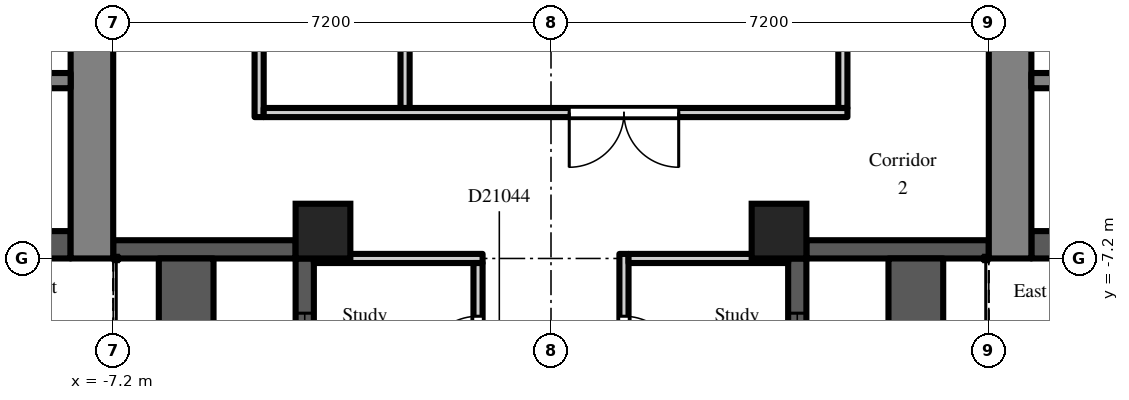
"""IFC4 building model, lengths in metres.
Left out: names, types, materials, properties, quantities, classifications, styles, units other than length and angle.
Written with IfcOpenShell. Run it as: python <this file> out.ifc"""

import sys

from ifc_helpers import new_model, si_unit, direction, frame, frame_2d, origin, origin_2d, place, context, subcontext, project, spatial, rectangle, extrude, element, fill, save


model = new_model("IFC4")
c1 = context("Model", 3, precision=1e-05, world=origin(), true_north=direction((0.0, 1.0)))
c2 = subcontext(c1, "Body", "Model", "MODEL_VIEW")
j1 = project(units=[si_unit("LENGTHUNIT", "METRE"), si_unit("PLANEANGLEUNIT", "RADIAN")], contexts=[c1])
p1 = place(None, origin())
s1 = spatial("IfcSite", under=j1, at=p1, CompositionType="ELEMENT")
p2 = place(p1, origin())
s2 = spatial("IfcBuilding", under=s1, at=p2, CompositionType="ELEMENT")
p3 = place(p2, frame((0.0, 0.0, 147.3)))
s3 = spatial("IfcBuildingStorey", under=s2, at=p3, CompositionType="ELEMENT", Elevation=147.3)
for number, where, z_axis, x_axis in (
    (1, (-3.75, -6.75, 0.0), (0.0, 0.0, 1.0), (1.0, 0.0, 0.0)),
    (2, (3.75, -6.75, 0.0), (0.0, 0.0, 1.0), (1.0, 0.0, 0.0)),
):
    element("IfcColumn", number, at=place(p3, frame(where, z_axis=z_axis, x_axis=x_axis)), inside=s3, PredefinedType="COLUMN", context=c2, shape_type="SweptSolid", body=[
        extrude(rectangle(XDim=0.9, YDim=0.9, at=origin_2d()), origin(), (0.0, 0.0, 1.0), 3.0),
    ])
p4 = place(p3, frame((-7.2, -7.05, 0.0), z_axis=(0.0, 0.0, 1.0), x_axis=(1.0, 0.0, 0.0)))
e3 = element("IfcWall", 3, at=p4, inside=s3, PredefinedType="SOLIDWALL", context=c2, shape_type="SweptSolid", body=[
    extrude(rectangle(XDim=3.0, YDim=0.3, at=frame_2d((1.5, 0.0))), origin(), (0.0, 0.0, 1.0), 2.2),
])
p5 = place(p3, frame((-4.05, -7.2, 0.0), z_axis=(0.0, 0.0, 1.0), x_axis=(0.0, -1.0, 0.0)))
e4 = element("IfcWall", 4, at=p5, inside=s3, PredefinedType="SOLIDWALL", context=c2, shape_type="SweptSolid", body=[
    extrude(rectangle(XDim=7.2, YDim=0.3, at=frame_2d((3.6, 0.0))), origin(), (0.0, 0.0, 1.0), 2.2),
])
p6 = place(p5, frame((3.0, 0.0, 0.0)))
e5 = element("IfcOpeningElement", 5, at=p6, cuts=e4, PredefinedType="OPENING", context=c2, shape_type="SweptSolid", body=[
    extrude(rectangle(XDim=1.2, YDim=2.05, at=frame_2d((0.6, 1.025))), frame((0.0, 0.16, 0.0), z_axis=(0.0, -1.0, 0.0), x_axis=(1.0, 0.0, 0.0)), (0.0, 0.0, 1.0), 0.32),
])
p7 = place(p5, frame((0.9, 0.0, 0.2)))
e6 = element("IfcOpeningElement", 6, at=p7, cuts=e4, PredefinedType="OPENING", context=c2, shape_type="SweptSolid", body=[
    extrude(rectangle(XDim=1.8, YDim=1.85, at=frame_2d((0.9, 0.925))), frame((0.0, 0.16, 0.0), z_axis=(0.0, -1.0, 0.0), x_axis=(1.0, 0.0, 0.0)), (0.0, 0.0, 1.0), 0.32),
])
p8 = place(p5, frame((4.5, 0.0, 0.2)))
e7 = element("IfcOpeningElement", 7, at=p8, cuts=e4, PredefinedType="OPENING", context=c2, shape_type="SweptSolid", body=[
    extrude(rectangle(XDim=1.8, YDim=1.85, at=frame_2d((0.9, 0.925))), frame((0.0, 0.16, 0.0), z_axis=(0.0, -1.0, 0.0), x_axis=(1.0, 0.0, 0.0)), (0.0, 0.0, 1.0), 0.32),
])
p9 = place(p3, frame((4.05, -14.4, 0.0), z_axis=(0.0, 0.0, 1.0), x_axis=(0.0, 1.0, 0.0)))
e8 = element("IfcWall", 8, at=p9, inside=s3, PredefinedType="SOLIDWALL", context=c2, shape_type="SweptSolid", body=[
    extrude(rectangle(XDim=7.2, YDim=0.3, at=frame_2d((3.6, 0.0))), origin(), (0.0, 0.0, 1.0), 2.2),
])
p10 = place(p9, frame((3.0, 0.0, 0.0)))
e9 = element("IfcOpeningElement", 9, at=p10, cuts=e8, PredefinedType="OPENING", context=c2, shape_type="SweptSolid", body=[
    extrude(rectangle(XDim=1.2, YDim=2.05, at=frame_2d((0.6, 1.025))), frame((0.0, 0.16, 0.0), z_axis=(0.0, -1.0, 0.0), x_axis=(1.0, 0.0, 0.0)), (0.0, 0.0, 1.0), 0.32),
])
p11 = place(p9, frame((0.9, 0.0, 0.2)))
e10 = element("IfcOpeningElement", 10, at=p11, cuts=e8, PredefinedType="OPENING", context=c2, shape_type="SweptSolid", body=[
    extrude(rectangle(XDim=1.8, YDim=1.85, at=frame_2d((0.9, 0.925))), frame((0.0, 0.16, 0.0), z_axis=(0.0, -1.0, 0.0), x_axis=(1.0, 0.0, 0.0)), (0.0, 0.0, 1.0), 0.32),
])
p12 = place(p9, frame((4.5, 0.0, 0.2)))
e11 = element("IfcOpeningElement", 11, at=p12, cuts=e8, PredefinedType="OPENING", context=c2, shape_type="SweptSolid", body=[
    extrude(rectangle(XDim=1.8, YDim=1.85, at=frame_2d((0.9, 0.925))), frame((0.0, 0.16, 0.0), z_axis=(0.0, -1.0, 0.0), x_axis=(1.0, 0.0, 0.0)), (0.0, 0.0, 1.0), 0.32),
])
p13 = place(p3, frame((4.2, -7.05, 0.0), z_axis=(0.0, 0.0, 1.0), x_axis=(1.0, 0.0, 0.0)))
e12 = element("IfcWall", 12, at=p13, inside=s3, PredefinedType="SOLIDWALL", context=c2, shape_type="SweptSolid", body=[
    extrude(rectangle(XDim=3.0, YDim=0.3, at=frame_2d((1.5, 0.0))), origin(), (0.0, 0.0, 1.0), 2.2),
])
for number, where, z_axis, x_axis in (
    (13, (6.0, -14.4, 0.0), (0.0, 0.0, 1.0), (0.0, 1.0, 0.0)),
    (14, (-6.0, -14.4, 0.0), (0.0, 0.0, 1.0), (0.0, 1.0, 0.0)),
):
    element("IfcWall", number, at=place(p3, frame(where, z_axis=z_axis, x_axis=x_axis)), inside=s3, PredefinedType="PARAPET", context=c2, shape_type="SweptSolid", body=[
        extrude(rectangle(XDim=7.2, YDim=0.9, at=frame_2d((3.6, 0.0))), origin(), (0.0, 0.0, 1.0), 0.8),
    ])
p14 = place(p3, frame((7.55, -7.2, 0.0), z_axis=(0.0, 0.0, 1.0), x_axis=(0.0, 1.0, 0.0)))
e15 = element("IfcWall", 15, at=p14, inside=s3, PredefinedType="SHEAR", context=c2, shape_type="SweptSolid", body=[
    extrude(rectangle(XDim=14.4, YDim=0.7, at=frame_2d((7.2, 0.0))), origin(), (0.0, 0.0, 1.0), 2.6),
])
p15 = place(p14, frame((6.0, 0.0, 0.0)))
e16 = element("IfcOpeningElement", 16, at=p15, cuts=e15, PredefinedType="OPENING", context=c2, shape_type="SweptSolid", body=[
    extrude(rectangle(XDim=2.4, YDim=2.2, at=frame_2d((1.2, 1.1))), frame((0.0, 0.36, 0.0), z_axis=(0.0, -1.0, 0.0), x_axis=(1.0, 0.0, 0.0)), (0.0, 0.0, 1.0), 0.72),
])
p16 = place(p3, frame((7.9, -6.975, 0.0), z_axis=(0.0, 0.0, 1.0), x_axis=(1.0, 0.0, 0.0)))
e17 = element("IfcWall", 17, at=p16, inside=s3, PredefinedType="SHEAR", context=c2, shape_type="SweptSolid", body=[
    extrude(rectangle(XDim=12.95, YDim=0.45, at=frame_2d((6.475, 0.0))), origin(), (0.0, 0.0, 1.0), 2.6),
])
p17 = place(p3, frame((7.9, -4.275, 0.0), z_axis=(0.0, 0.0, 1.0), x_axis=(1.0, 0.0, 0.0)))
e18 = element("IfcWall", 18, at=p17, inside=s3, PredefinedType="SHEAR", context=c2, shape_type="SweptSolid", body=[
    extrude(rectangle(XDim=1.95, YDim=0.25, at=frame_2d((0.975, 0.0))), origin(), (0.0, 0.0, 1.0), 2.6),
])
p18 = place(p3, frame((-7.55, -7.2, 0.0), z_axis=(0.0, 0.0, 1.0), x_axis=(0.0, 1.0, 0.0)))
e19 = element("IfcWall", 19, at=p18, inside=s3, PredefinedType="SHEAR", context=c2, shape_type="SweptSolid", body=[
    extrude(rectangle(XDim=14.4, YDim=0.7, at=frame_2d((7.2, 0.0))), origin(), (0.0, 0.0, 1.0), 2.6),
])
p19 = place(p18, frame((6.0, 0.0, 0.0)))
e20 = element("IfcOpeningElement", 20, at=p19, cuts=e19, PredefinedType="OPENING", context=c2, shape_type="SweptSolid", body=[
    extrude(rectangle(XDim=2.4, YDim=2.2, at=frame_2d((1.2, 1.1))), frame((0.0, 0.36, 0.0), z_axis=(0.0, -1.0, 0.0), x_axis=(1.0, 0.0, 0.0)), (0.0, 0.0, 1.0), 0.72),
])
p20 = place(p3, frame((-7.9, -6.975, 0.0), z_axis=(0.0, 0.0, 1.0), x_axis=(-1.0, 0.0, 0.0)))
e21 = element("IfcWall", 21, at=p20, inside=s3, PredefinedType="SHEAR", context=c2, shape_type="SweptSolid", body=[
    extrude(rectangle(XDim=12.95, YDim=0.45, at=frame_2d((6.475, 0.0))), origin(), (0.0, 0.0, 1.0), 2.6),
])
p21 = place(p3, frame((-7.9, -4.275, 0.0), z_axis=(0.0, 0.0, 1.0), x_axis=(-1.0, 0.0, 0.0)))
e22 = element("IfcWall", 22, at=p21, inside=s3, PredefinedType="SHEAR", context=c2, shape_type="SweptSolid", body=[
    extrude(rectangle(XDim=1.95, YDim=0.25, at=frame_2d((0.975, 0.0))), origin(), (0.0, 0.0, 1.0), 2.6),
])
p22 = place(p3, frame((-4.8, -4.875, 0.0), z_axis=(0.0, 0.0, 1.0), x_axis=(0.0, 1.0, 0.0)))
e23 = element("IfcWall", 23, at=p22, inside=s3, PredefinedType="PARTITIONING", context=c2, shape_type="SweptSolid", body=[
    extrude(rectangle(XDim=9.75, YDim=0.15, at=frame_2d((4.875, 0.0))), origin(), (0.0, 0.0, 1.0), 2.6),
])
p23 = place(p22, frame((5.625, 0.0, 0.0)))
e24 = element("IfcOpeningElement", 24, at=p23, cuts=e23, PredefinedType="OPENING", context=c2, shape_type="SweptSolid", body=[
    extrude(rectangle(XDim=0.9, YDim=2.1, at=frame_2d((0.45, 1.05))), frame((0.0, 0.085, 0.0), z_axis=(0.0, -1.0, 0.0), x_axis=(1.0, 0.0, 0.0)), (0.0, 0.0, 1.0), 0.17),
])
p24 = place(p22, frame((2.025, 0.0, 0.0)))
e25 = element("IfcOpeningElement", 25, at=p24, cuts=e23, PredefinedType="OPENING", context=c2, shape_type="SweptSolid", body=[
    extrude(rectangle(XDim=0.9, YDim=2.1, at=frame_2d((0.45, 1.05))), frame((0.0, 0.085, 0.0), z_axis=(0.0, -1.0, 0.0), x_axis=(1.0, 0.0, 0.0)), (0.0, 0.0, 1.0), 0.17),
])
p25 = place(p3, frame((-4.725, -4.8, 0.0), z_axis=(0.0, 0.0, 1.0), x_axis=(1.0, 0.0, 0.0)))
e26 = element("IfcWall", 26, at=p25, inside=s3, PredefinedType="PARTITIONING", context=c2, shape_type="SweptSolid", body=[
    extrude(rectangle(XDim=9.6, YDim=0.15, at=frame_2d((4.8, 0.0))), origin(), (0.0, 0.0, 1.0), 2.6),
])
p26 = place(p25, frame((5.025, 0.0, 0.0)))
e27 = element("IfcOpeningElement", 27, at=p26, cuts=e26, PredefinedType="OPENING", context=c2, shape_type="SweptSolid", body=[
    extrude(rectangle(XDim=1.8, YDim=2.1, at=frame_2d((0.9, 1.05))), frame((0.0, 0.085, 0.0), z_axis=(0.0, -1.0, 0.0), x_axis=(1.0, 0.0, 0.0)), (0.0, 0.0, 1.0), 0.17),
])
p27 = place(p3, frame((-3.9, -7.2, 0.0), z_axis=(0.0, 0.0, 1.0), x_axis=(1.0, 0.0, 0.0)))
e28 = element("IfcWall", 28, at=p27, inside=s3, PredefinedType="PARTITIONING", context=c2, shape_type="SweptSolid", body=[
    extrude(rectangle(XDim=2.775, YDim=0.15, at=frame_2d((1.387, 0.0))), origin(), (0.0, 0.0, 1.0), 2.6),
])
p28 = place(p3, frame((-2.4, -4.725, 0.0), z_axis=(0.0, 0.0, 1.0), x_axis=(0.0, 1.0, 0.0)))
e29 = element("IfcWall", 29, at=p28, inside=s3, PredefinedType="PARTITIONING", context=c2, shape_type="SweptSolid", body=[
    extrude(rectangle(XDim=4.65, YDim=0.15, at=frame_2d((2.325, 0.0))), origin(), (0.0, 0.0, 1.0), 2.6),
])
p29 = place(p3, frame((-1.2, -17.925, 0.0), z_axis=(0.0, 0.0, 1.0), x_axis=(0.0, 1.0, 0.0)))
e30 = element("IfcWall", 30, at=p29, inside=s3, PredefinedType="PARTITIONING", context=c2, shape_type="SweptSolid", body=[
    extrude(rectangle(XDim=10.65, YDim=0.15, at=frame_2d((5.325, 0.0))), origin(), (0.0, 0.0, 1.0), 2.6),
])
p30 = place(p29, frame((8.875, 0.0, 0.0)))
e31 = element("IfcOpeningElement", 31, at=p30, cuts=e30, PredefinedType="OPENING", context=c2, shape_type="SweptSolid", body=[
    extrude(rectangle(XDim=0.9, YDim=2.1, at=frame_2d((0.45, 1.05))), frame((0.0, 0.085, 0.0), z_axis=(0.0, -1.0, 0.0), x_axis=(1.0, 0.0, 0.0)), (0.0, 0.0, 1.0), 0.17),
])
p31 = place(p29, frame((5.275, 0.0, 0.0)))
e32 = element("IfcOpeningElement", 32, at=p31, cuts=e30, PredefinedType="OPENING", context=c2, shape_type="SweptSolid", body=[
    extrude(rectangle(XDim=0.9, YDim=2.1, at=frame_2d((0.45, 1.05))), frame((0.0, 0.085, 0.0), z_axis=(0.0, -1.0, 0.0), x_axis=(1.0, 0.0, 0.0)), (0.0, 0.0, 1.0), 0.17),
])
p32 = place(p29, frame((2.325, 0.0, 0.0)))
e33 = element("IfcOpeningElement", 33, at=p32, cuts=e30, PredefinedType="OPENING", context=c2, shape_type="SweptSolid", body=[
    extrude(rectangle(XDim=1.0, YDim=2.1, at=frame_2d((0.5, 1.05))), frame((0.0, 0.085, 0.0), z_axis=(0.0, -1.0, 0.0), x_axis=(1.0, 0.0, 0.0)), (0.0, 0.0, 1.0), 0.17),
])
p33 = place(p3, frame((1.2, -17.925, 0.0), z_axis=(0.0, 0.0, 1.0), x_axis=(0.0, 1.0, 0.0)))
e34 = element("IfcWall", 34, at=p33, inside=s3, PredefinedType="PARTITIONING", context=c2, shape_type="SweptSolid", body=[
    extrude(rectangle(XDim=10.8, YDim=0.15, at=frame_2d((5.4, 0.0))), origin(), (0.0, 0.0, 1.0), 2.6),
])
p34 = place(p33, frame((8.875, 0.0, 0.0)))
e35 = element("IfcOpeningElement", 35, at=p34, cuts=e34, PredefinedType="OPENING", context=c2, shape_type="SweptSolid", body=[
    extrude(rectangle(XDim=0.9, YDim=2.1, at=frame_2d((0.45, 1.05))), frame((0.0, 0.085, 0.0), z_axis=(0.0, -1.0, 0.0), x_axis=(1.0, 0.0, 0.0)), (0.0, 0.0, 1.0), 0.17),
])
p35 = place(p33, frame((5.275, 0.0, 0.0)))
e36 = element("IfcOpeningElement", 36, at=p35, cuts=e34, PredefinedType="OPENING", context=c2, shape_type="SweptSolid", body=[
    extrude(rectangle(XDim=0.9, YDim=2.1, at=frame_2d((0.45, 1.05))), frame((0.0, 0.085, 0.0), z_axis=(0.0, -1.0, 0.0), x_axis=(1.0, 0.0, 0.0)), (0.0, 0.0, 1.0), 0.17),
])
p36 = place(p33, frame((1.925, 0.0, 0.0)))
e37 = element("IfcOpeningElement", 37, at=p36, cuts=e34, PredefinedType="OPENING", context=c2, shape_type="SweptSolid", body=[
    extrude(rectangle(XDim=1.0, YDim=2.1, at=frame_2d((0.5, 1.05))), frame((0.0, 0.085, 0.0), z_axis=(0.0, -1.0, 0.0), x_axis=(1.0, 0.0, 0.0)), (0.0, 0.0, 1.0), 0.17),
])
p37 = place(p3, frame((1.275, -7.2, 0.0), z_axis=(0.0, 0.0, 1.0), x_axis=(1.0, 0.0, 0.0)))
e38 = element("IfcWall", 38, at=p37, inside=s3, PredefinedType="PARTITIONING", context=c2, shape_type="SweptSolid", body=[
    extrude(rectangle(XDim=2.625, YDim=0.15, at=frame_2d((1.312, 0.0))), origin(), (0.0, 0.0, 1.0), 2.6),
])
p38 = place(p3, frame((4.8, -4.725, 0.0), z_axis=(0.0, 0.0, 1.0), x_axis=(0.0, 1.0, 0.0)))
e39 = element("IfcWall", 39, at=p38, inside=s3, PredefinedType="PARTITIONING", context=c2, shape_type="SweptSolid", body=[
    extrude(rectangle(XDim=9.45, YDim=0.15, at=frame_2d((4.725, 0.0))), origin(), (0.0, 0.0, 1.0), 2.6),
])
p39 = place(p7, origin())
e40 = element("IfcWindow", 40, at=p39, inside=s3, PartitioningType="SINGLE_PANEL", PredefinedType="WINDOW", context=c2, shape_type="SweptSolid", body=[
    extrude(rectangle(XDim=1.8, YDim=1.85, at=frame_2d((0.9, 0.925))), frame((0.0, 0.03, 0.0), z_axis=(0.0, -1.0, 0.0), x_axis=(1.0, 0.0, 0.0)), (0.0, 0.0, 1.0), 0.06),
])
fill(e6, e40)
p40 = place(p12, origin())
e41 = element("IfcWindow", 41, at=p40, inside=s3, PartitioningType="SINGLE_PANEL", PredefinedType="WINDOW", context=c2, shape_type="SweptSolid", body=[
    extrude(rectangle(XDim=1.8, YDim=1.85, at=frame_2d((0.9, 0.925))), frame((0.0, 0.03, 0.0), z_axis=(0.0, -1.0, 0.0), x_axis=(1.0, 0.0, 0.0)), (0.0, 0.0, 1.0), 0.06),
])
fill(e11, e41)
p41 = place(p26, frame((1.8, 0.0, 0.0), z_axis=(0.0, 0.0, 1.0), x_axis=(-1.0, 0.0, 0.0)))
e42 = element("IfcDoor", 42, at=p41, inside=s3, OperationType="DOUBLE_DOOR_DOUBLE_SWING", PredefinedType="DOOR", context=c2, shape_type="SweptSolid", body=[
    extrude(rectangle(XDim=1.8, YDim=2.1, at=frame_2d((0.9, 1.05))), frame((0.0, 0.025, 0.0), z_axis=(0.0, -1.0, 0.0), x_axis=(1.0, 0.0, 0.0)), (0.0, 0.0, 1.0), 0.05),
])
fill(e27, e42)
p42 = place(p34, frame((0.9, 0.0, 0.0), z_axis=(0.0, 0.0, 1.0), x_axis=(-1.0, 0.0, 0.0)))
e43 = element("IfcDoor", 43, at=p42, inside=s3, OperationType="SINGLE_SWING_RIGHT", PredefinedType="DOOR", context=c2, shape_type="SweptSolid", body=[
    extrude(rectangle(XDim=0.9, YDim=2.1, at=frame_2d((0.45, 1.05))), frame((0.0, 0.025, 0.0), z_axis=(0.0, -1.0, 0.0), x_axis=(1.0, 0.0, 0.0)), (0.0, 0.0, 1.0), 0.05),
])
fill(e35, e43)
p43 = place(p30, origin())
e44 = element("IfcDoor", 44, at=p43, inside=s3, OperationType="SINGLE_SWING_LEFT", PredefinedType="DOOR", context=c2, shape_type="SweptSolid", body=[
    extrude(rectangle(XDim=0.9, YDim=2.1, at=frame_2d((0.45, 1.05))), frame((0.0, 0.025, 0.0), z_axis=(0.0, -1.0, 0.0), x_axis=(1.0, 0.0, 0.0)), (0.0, 0.0, 1.0), 0.05),
])
fill(e31, e44)
save(model, sys.argv[1])
